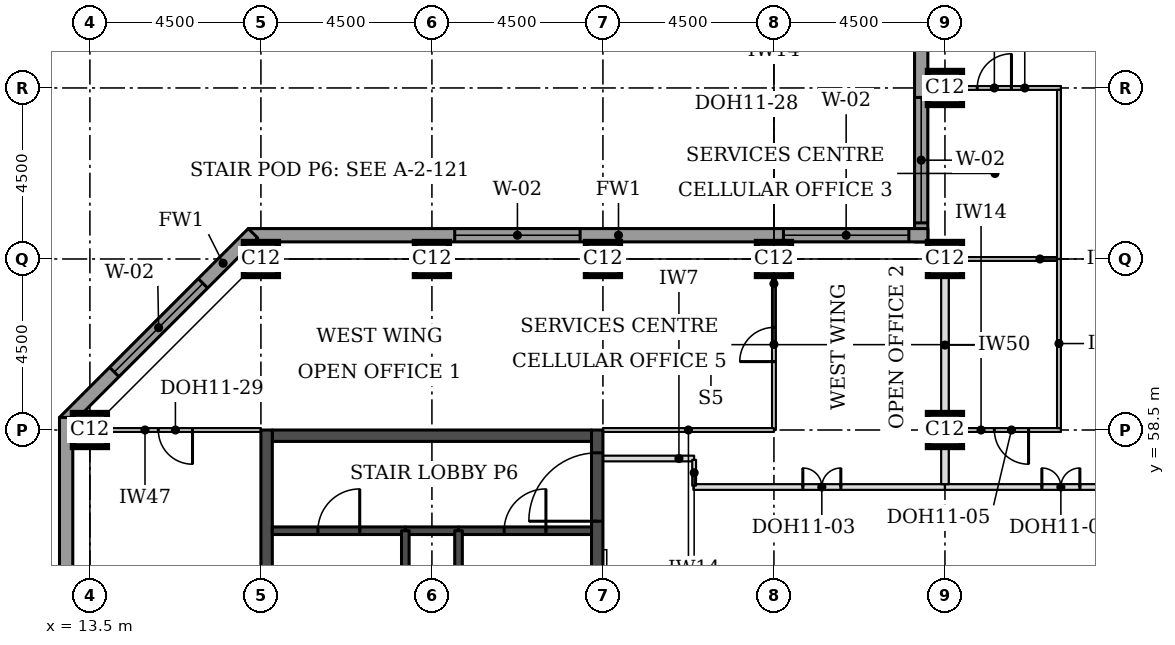
"""IFC4 building model, lengths in metres.
Left out: names, types, materials, properties, quantities, classifications, styles, units other than length and angle.
Written with IfcOpenShell. Run it as: python <this file> out.ifc"""

import sys

from ifc_helpers import new_model, si_unit, direction, frame, frame_2d, origin, origin_2d, place, context, subcontext, project, spatial, rectangle, extrude, element, fill, save


model = new_model("IFC4")
c1 = context("Model", 3, precision=1e-05, world=origin(), true_north=direction((0.0, 1.0)))
c2 = subcontext(c1, "Body", "Model", "MODEL_VIEW")
j1 = project(units=[si_unit("LENGTHUNIT", "METRE"), si_unit("PLANEANGLEUNIT", "RADIAN")], contexts=[c1])
p1 = place(None, origin())
s1 = spatial("IfcSite", under=j1, at=p1, CompositionType="ELEMENT")
p2 = place(p1, origin())
s2 = spatial("IfcBuilding", under=s1, at=p2, CompositionType="ELEMENT")
p3 = place(p2, frame((0.0, 0.0, 237.8)))
s3 = spatial("IfcBuildingStorey", under=s2, at=p3, CompositionType="ELEMENT", Elevation=237.8)
for number, where, z_axis, x_axis in (
    (1, (13.5, 58.5, 0.0), (0.0, 0.0, 1.0), (1.0, 0.0, 0.0)),
    (2, (36.0, 58.5, 0.0), (0.0, 0.0, 1.0), (1.0, 0.0, 0.0)),
    (3, (18.0, 63.0, 0.0), (0.0, 0.0, 1.0), (1.0, 0.0, 0.0)),
    (4, (22.5, 63.0, 0.0), (0.0, 0.0, 1.0), (1.0, 0.0, 0.0)),
    (5, (27.0, 63.0, 0.0), (0.0, 0.0, 1.0), (1.0, 0.0, 0.0)),
    (6, (31.5, 63.0, 0.0), (0.0, 0.0, 1.0), (1.0, 0.0, 0.0)),
    (7, (36.0, 63.0, 0.0), (0.0, 0.0, 1.0), (1.0, 0.0, 0.0)),
    (8, (36.0, 67.5, 0.0), (0.0, 0.0, 1.0), (1.0, 0.0, 0.0)),
):
    element("IfcColumn", number, at=place(p3, frame(where, z_axis=z_axis, x_axis=x_axis)), inside=s3, PredefinedType="COLUMN", context=c2, shape_type="SweptSolid", body=[
        extrude(rectangle(XDim=0.9, YDim=0.9, at=origin_2d()), origin(), (0.0, 0.0, 1.0), 3.7),
    ])
p4 = place(p3, frame((18.3, 58.35, 0.0), z_axis=(0.0, 0.0, 1.0), x_axis=(1.0, 0.0, 0.0)))
e9 = element("IfcWall", 9, at=p4, inside=s3, PredefinedType="SHEAR", context=c2, shape_type="SweptSolid", body=[
    extrude(rectangle(XDim=8.4, YDim=0.3, at=frame_2d((4.2, 0.0))), origin(), (0.0, 0.0, 1.0), 3.7),
])
p5 = place(p3, frame((18.15, 49.5, 0.0), z_axis=(0.0, 0.0, 1.0), x_axis=(0.0, 1.0, 0.0)))
e10 = element("IfcWall", 10, at=p5, inside=s3, PredefinedType="SHEAR", context=c2, shape_type="SweptSolid", body=[
    extrude(rectangle(XDim=9.0, YDim=0.3, at=frame_2d((4.5, 0.0))), origin(), (0.0, 0.0, 1.0), 3.7),
])
p6 = place(p3, frame((26.85, 49.5, 0.0), z_axis=(0.0, 0.0, 1.0), x_axis=(0.0, 1.0, 0.0)))
e11 = element("IfcWall", 11, at=p6, inside=s3, PredefinedType="SHEAR", context=c2, shape_type="SweptSolid", body=[
    extrude(rectangle(XDim=9.0, YDim=0.3, at=frame_2d((4.5, 0.0))), origin(), (0.0, 0.0, 1.0), 3.7),
])
p7 = place(p6, frame((6.6, 0.0, 0.0)))
e12 = element("IfcOpeningElement", 12, at=p7, cuts=e11, PredefinedType="OPENING", context=c2, shape_type="SweptSolid", body=[
    extrude(rectangle(XDim=1.8, YDim=2.1, at=frame_2d((0.9, 1.05))), frame((0.0, 0.16, 0.0), z_axis=(0.0, -1.0, 0.0), x_axis=(1.0, 0.0, 0.0)), (0.0, 0.0, 1.0), 0.32),
])
p8 = place(p3, frame((35.375, 76.831, 0.0), z_axis=(0.0, 0.0, 1.0), x_axis=(0.0, -1.0, 0.0)))
e13 = element("IfcWall", 13, at=p8, inside=s3, PredefinedType="STANDARD", context=c2, shape_type="SweptSolid", body=[
    extrude(rectangle(XDim=13.381, YDim=0.35, at=frame_2d((6.691, 0.0))), origin(), (0.0, 0.0, 1.0), 3.525),
])
p9 = place(p8, frame((9.581, 0.0, 0.9)))
e14 = element("IfcOpeningElement", 14, at=p9, cuts=e13, PredefinedType="OPENING", context=c2, shape_type="SweptSolid", body=[
    extrude(rectangle(XDim=3.3, YDim=1.9, at=frame_2d((1.65, 0.95))), frame((0.0, 0.185, 0.0), z_axis=(0.0, -1.0, 0.0), x_axis=(1.0, 0.0, 0.0)), (0.0, 0.0, 1.0), 0.37),
])
p10 = place(p3, frame((35.55, 63.625, 0.0), z_axis=(0.0, 0.0, 1.0), x_axis=(-1.0, 0.0, 0.0)))
e15 = element("IfcWall", 15, at=p10, inside=s3, PredefinedType="STANDARD", context=c2, shape_type="SweptSolid", body=[
    extrude(rectangle(XDim=17.881, YDim=0.35, at=frame_2d((8.941, 0.0))), origin(), (0.0, 0.0, 1.0), 3.525),
])
p11 = place(p10, frame((0.5, 0.0, 0.9)))
e16 = element("IfcOpeningElement", 16, at=p11, cuts=e15, PredefinedType="OPENING", context=c2, shape_type="SweptSolid", body=[
    extrude(rectangle(XDim=3.3, YDim=1.9, at=frame_2d((1.65, 0.95))), frame((0.0, 0.185, 0.0), z_axis=(0.0, -1.0, 0.0), x_axis=(1.0, 0.0, 0.0)), (0.0, 0.0, 1.0), 0.37),
])
p12 = place(p10, frame((9.15, 0.0, 0.9)))
e17 = element("IfcOpeningElement", 17, at=p12, cuts=e15, PredefinedType="OPENING", context=c2, shape_type="SweptSolid", body=[
    extrude(rectangle(XDim=3.3, YDim=1.9, at=frame_2d((1.65, 0.95))), frame((0.0, 0.185, 0.0), z_axis=(0.0, -1.0, 0.0), x_axis=(1.0, 0.0, 0.0)), (0.0, 0.0, 1.0), 0.37),
])
p13 = place(p3, frame((17.792, 63.676, 0.0), z_axis=(0.0, 0.0, 1.0), x_axis=(-0.707106781187, -0.707106781187, 0.0)))
e18 = element("IfcWall", 18, at=p13, inside=s3, PredefinedType="STANDARD", context=c2, shape_type="SweptSolid", body=[
    extrude(rectangle(XDim=7.027, YDim=0.35, at=frame_2d((3.513, 0.0))), origin(), (0.0, 0.0, 1.0), 3.525),
])
p14 = place(p13, frame((1.863, 0.0, 0.9)))
e19 = element("IfcOpeningElement", 19, at=p14, cuts=e18, PredefinedType="OPENING", context=c2, shape_type="SweptSolid", body=[
    extrude(rectangle(XDim=3.3, YDim=1.9, at=frame_2d((1.65, 0.95))), frame((0.0, 0.185, 0.0), z_axis=(0.0, -1.0, 0.0), x_axis=(1.0, 0.0, 0.0)), (0.0, 0.0, 1.0), 0.37),
])
p15 = place(p3, frame((12.875, 58.831, 0.0), z_axis=(0.0, 0.0, 1.0), x_axis=(0.0, -1.0, 0.0)))
e20 = element("IfcWall", 20, at=p15, inside=s3, PredefinedType="STANDARD", context=c2, shape_type="SweptSolid", body=[
    extrude(rectangle(XDim=14.163, YDim=0.35, at=frame_2d((7.081, 0.0))), origin(), (0.0, 0.0, 1.0), 3.525),
])
p16 = place(p15, frame((5.431, 0.0, 0.9)))
e21 = element("IfcOpeningElement", 21, at=p16, cuts=e20, PredefinedType="OPENING", context=c2, shape_type="SweptSolid", body=[
    extrude(rectangle(XDim=3.3, YDim=1.9, at=frame_2d((1.65, 0.95))), frame((0.0, 0.185, 0.0), z_axis=(0.0, -1.0, 0.0), x_axis=(1.0, 0.0, 0.0)), (0.0, 0.0, 1.0), 0.37),
])
p17 = place(p3, frame((29.38, 57.0, 0.0), z_axis=(0.0, 0.0, 1.0), x_axis=(1.0, 0.0, 0.0)))
e22 = element("IfcWall", 22, at=p17, inside=s3, PredefinedType="PARTITIONING", context=c2, shape_type="SweptSolid", body=[
    extrude(rectangle(XDim=6.62, YDim=0.15, at=frame_2d((3.31, 0.0))), origin(), (0.0, 0.0, 1.0), 3.55),
])
p18 = place(p17, frame((2.88, 0.0, 0.0)))
e23 = element("IfcOpeningElement", 23, at=p18, cuts=e22, PredefinedType="OPENING", context=c2, shape_type="SweptSolid", body=[
    extrude(rectangle(XDim=1.0, YDim=2.1, at=frame_2d((0.5, 1.05))), frame((0.0, 0.085, 0.0), z_axis=(0.0, -1.0, 0.0), x_axis=(1.0, 0.0, 0.0)), (0.0, 0.0, 1.0), 0.17),
])
p19 = place(p3, frame((36.0, 57.0, 0.0), z_axis=(0.0, 0.0, 1.0), x_axis=(1.0, 0.0, 0.0)))
e24 = element("IfcWall", 24, at=p19, inside=s3, PredefinedType="PARTITIONING", context=c2, shape_type="SweptSolid", body=[
    extrude(rectangle(XDim=6.075, YDim=0.15, at=frame_2d((3.038, 0.0))), origin(), (0.0, 0.0, 1.0), 3.55),
])
p20 = place(p19, frame((2.55, 0.0, 0.0)))
e25 = element("IfcOpeningElement", 25, at=p20, cuts=e24, PredefinedType="OPENING", context=c2, shape_type="SweptSolid", body=[
    extrude(rectangle(XDim=1.0, YDim=2.1, at=frame_2d((0.5, 1.05))), frame((0.0, 0.085, 0.0), z_axis=(0.0, -1.0, 0.0), x_axis=(1.0, 0.0, 0.0)), (0.0, 0.0, 1.0), 0.17),
])
p21 = place(p3, frame((36.45, 58.5, 0.0), z_axis=(0.0, 0.0, 1.0), x_axis=(1.0, 0.0, 0.0)))
e26 = element("IfcWall", 26, at=p21, inside=s3, PredefinedType="PARTITIONING", context=c2, shape_type="SweptSolid", body=[
    extrude(rectangle(XDim=2.6, YDim=0.1, at=frame_2d((1.3, 0.0))), origin(), (0.0, 0.0, 1.0), 3.55),
])
p22 = place(p21, frame((0.85, 0.0, 0.0)))
e27 = element("IfcOpeningElement", 27, at=p22, cuts=e26, PredefinedType="OPENING", context=c2, shape_type="SweptSolid", body=[
    extrude(rectangle(XDim=0.9, YDim=2.1, at=frame_2d((0.45, 1.05))), frame((0.0, 0.06, 0.0), z_axis=(0.0, -1.0, 0.0), x_axis=(1.0, 0.0, 0.0)), (0.0, 0.0, 1.0), 0.12),
])
p23 = place(p3, frame((36.45, 63.0, 0.0), z_axis=(0.0, 0.0, 1.0), x_axis=(1.0, 0.0, 0.0)))
e28 = element("IfcWall", 28, at=p23, inside=s3, PredefinedType="PARTITIONING", context=c2, shape_type="SweptSolid", body=[
    extrude(rectangle(XDim=2.5, YDim=0.1, at=frame_2d((1.25, 0.0))), origin(), (0.0, 0.0, 1.0), 3.55),
])
p24 = place(p3, frame((35.55, 67.5, 0.0), z_axis=(0.0, 0.0, 1.0), x_axis=(1.0, 0.0, 0.0)))
e29 = element("IfcWall", 29, at=p24, inside=s3, PredefinedType="PARTITIONING", context=c2, shape_type="SweptSolid", body=[
    extrude(rectangle(XDim=3.5, YDim=0.1, at=frame_2d((1.75, 0.0))), origin(), (0.0, 0.0, 1.0), 3.55),
])
p25 = place(p24, frame((1.3, 0.0, 0.0)))
e30 = element("IfcOpeningElement", 30, at=p25, cuts=e29, PredefinedType="OPENING", context=c2, shape_type="SweptSolid", body=[
    extrude(rectangle(XDim=0.9, YDim=2.1, at=frame_2d((0.45, 1.05))), frame((0.0, 0.06, 0.0), z_axis=(0.0, -1.0, 0.0), x_axis=(1.0, 0.0, 0.0)), (0.0, 0.0, 1.0), 0.12),
])
p26 = place(p3, frame((36.0, 57.075, 0.0), z_axis=(0.0, 0.0, 1.0), x_axis=(0.0, 1.0, 0.0)))
e31 = element("IfcWall", 31, at=p26, inside=s3, PredefinedType="PARTITIONING", context=c2, shape_type="SweptSolid", body=[
    extrude(rectangle(XDim=0.975, YDim=0.2, at=frame_2d((0.488, 0.0))), origin(), (0.0, 0.0, 1.0), 2.8),
])
p27 = place(p3, frame((39.0, 58.55, 0.0), z_axis=(0.0, 0.0, 1.0), x_axis=(0.0, 1.0, 0.0)))
e32 = element("IfcWall", 32, at=p27, inside=s3, PredefinedType="PARTITIONING", context=c2, shape_type="SweptSolid", body=[
    extrude(rectangle(XDim=4.45, YDim=0.1, at=frame_2d((2.225, 0.0))), origin(), (0.0, 0.0, 1.0), 3.55),
])
p28 = place(p3, frame((36.0, 58.92, 0.0), z_axis=(0.0, 0.0, 1.0), x_axis=(0.0, 1.0, 0.0)))
e33 = element("IfcWall", 33, at=p28, inside=s3, PredefinedType="PARTITIONING", context=c2, shape_type="SweptSolid", body=[
    extrude(rectangle(XDim=3.63, YDim=0.2, at=frame_2d((1.815, 0.0))), origin(), (0.0, 0.0, 1.0), 2.8),
])
p29 = place(p3, frame((39.0, 63.0, 0.0), z_axis=(0.0, 0.0, 1.0), x_axis=(0.0, 1.0, 0.0)))
e34 = element("IfcWall", 34, at=p29, inside=s3, PredefinedType="PARTITIONING", context=c2, shape_type="SweptSolid", body=[
    extrude(rectangle(XDim=4.45, YDim=0.1, at=frame_2d((2.225, 0.0))), origin(), (0.0, 0.0, 1.0), 3.55),
])
p30 = place(p3, frame((31.5, 63.0, 0.0), z_axis=(0.0, 0.0, 1.0), x_axis=(0.0, -1.0, 0.0)))
e35 = element("IfcWall", 35, at=p30, inside=s3, PredefinedType="PARTITIONING", context=c2, shape_type="SweptSolid", body=[
    extrude(rectangle(XDim=4.5, YDim=0.1, at=frame_2d((2.25, 0.0))), origin(), (0.0, 0.0, 1.0), 3.55),
])
p31 = place(p30, frame((1.8, 0.0, 0.0)))
e36 = element("IfcOpeningElement", 36, at=p31, cuts=e35, PredefinedType="OPENING", context=c2, shape_type="SweptSolid", body=[
    extrude(rectangle(XDim=0.9, YDim=2.1, at=frame_2d((0.45, 1.05))), frame((0.0, 0.06, 0.0), z_axis=(0.0, -1.0, 0.0), x_axis=(1.0, 0.0, 0.0)), (0.0, 0.0, 1.0), 0.12),
])
p32 = place(p3, frame((31.5, 58.5, 0.0), z_axis=(0.0, 0.0, 1.0), x_axis=(-1.0, 0.0, 0.0)))
e37 = element("IfcWall", 37, at=p32, inside=s3, PredefinedType="PARTITIONING", context=c2, shape_type="SweptSolid", body=[
    extrude(rectangle(XDim=4.5, YDim=0.1, at=frame_2d((2.25, 0.0))), origin(), (0.0, 0.0, 1.0), 2.55),
])
p33 = place(p3, frame((13.5, 58.5, 0.0), z_axis=(0.0, 0.0, 1.0), x_axis=(1.0, 0.0, 0.0)))
e38 = element("IfcWall", 38, at=p33, inside=s3, PredefinedType="PARTITIONING", context=c2, shape_type="SweptSolid", body=[
    extrude(rectangle(XDim=4.5, YDim=0.1, at=frame_2d((2.25, 0.0))), origin(), (0.0, 0.0, 1.0), 2.55),
])
p34 = place(p33, frame((1.8, 0.0, 0.0)))
e39 = element("IfcOpeningElement", 39, at=p34, cuts=e38, PredefinedType="OPENING", context=c2, shape_type="SweptSolid", body=[
    extrude(rectangle(XDim=0.9, YDim=2.1, at=frame_2d((0.45, 1.05))), frame((0.0, 0.06, 0.0), z_axis=(0.0, -1.0, 0.0), x_axis=(1.0, 0.0, 0.0)), (0.0, 0.0, 1.0), 0.12),
])
p35 = place(p3, frame((27.0, 57.75, 0.0), z_axis=(0.0, 0.0, 1.0), x_axis=(1.0, 0.0, 0.0)))
e40 = element("IfcWall", 40, at=p35, inside=s3, PredefinedType="PARTITIONING", context=c2, shape_type="SweptSolid", body=[
    extrude(rectangle(XDim=2.4, YDim=0.15, at=frame_2d((1.2, 0.0))), origin(), (0.0, 0.0, 1.0), 3.55),
])
p36 = place(p3, frame((29.4, 57.715, 0.0), z_axis=(0.0, 0.0, 1.0), x_axis=(0.0, -1.0, 0.0)))
e41 = element("IfcWall", 41, at=p36, inside=s3, PredefinedType="PARTITIONING", context=c2, shape_type="SweptSolid", body=[
    extrude(rectangle(XDim=0.68, YDim=0.1, at=frame_2d((0.34, 0.0))), origin(), (0.0, 0.0, 1.0), 3.55),
])
p37 = place(p3, frame((21.8, 55.85, 0.0), z_axis=(0.0, 0.0, 1.0), x_axis=(1.0, 0.0, 0.0)))
e42 = element("IfcWall", 42, at=p37, inside=s3, PredefinedType="SOLIDWALL", context=c2, shape_type="SweptSolid", body=[
    extrude(rectangle(XDim=1.4, YDim=0.2, at=frame_2d((0.7, 0.0))), origin(), (0.0, 0.0, 1.0), 3.55),
])
p38 = place(p3, frame((18.3, 55.85, 0.0), z_axis=(0.0, 0.0, 1.0), x_axis=(1.0, 0.0, 0.0)))
e43 = element("IfcWall", 43, at=p38, inside=s3, PredefinedType="SOLIDWALL", context=c2, shape_type="SweptSolid", body=[
    extrude(rectangle(XDim=3.5, YDim=0.2, at=frame_2d((1.75, 0.0))), origin(), (0.0, 0.0, 1.0), 3.55),
])
p39 = place(p38, frame((1.2, 0.0, 0.0)))
e44 = element("IfcOpeningElement", 44, at=p39, cuts=e43, PredefinedType="OPENING", context=c2, shape_type="SweptSolid", body=[
    extrude(rectangle(XDim=1.1, YDim=2.1, at=frame_2d((0.55, 1.05))), frame((0.0, 0.11, 0.0), z_axis=(0.0, -1.0, 0.0), x_axis=(1.0, 0.0, 0.0)), (0.0, 0.0, 1.0), 0.22),
])
p40 = place(p3, frame((23.2, 55.85, 0.0), z_axis=(0.0, 0.0, 1.0), x_axis=(1.0, 0.0, 0.0)))
e45 = element("IfcWall", 45, at=p40, inside=s3, PredefinedType="SOLIDWALL", context=c2, shape_type="SweptSolid", body=[
    extrude(rectangle(XDim=3.5, YDim=0.2, at=frame_2d((1.75, 0.0))), origin(), (0.0, 0.0, 1.0), 3.55),
])
p41 = place(p40, frame((1.2, 0.0, 0.0)))
e46 = element("IfcOpeningElement", 46, at=p41, cuts=e45, PredefinedType="OPENING", context=c2, shape_type="SweptSolid", body=[
    extrude(rectangle(XDim=1.1, YDim=2.1, at=frame_2d((0.55, 1.05))), frame((0.0, 0.11, 0.0), z_axis=(0.0, -1.0, 0.0), x_axis=(1.0, 0.0, 0.0)), (0.0, 0.0, 1.0), 0.22),
])
for number, where, z_axis, x_axis in (
    (47, (21.8, 49.8, 0.0), (0.0, 0.0, 1.0), (0.0, 1.0, 0.0)),
    (48, (23.2, 49.8, 0.0), (0.0, 0.0, 1.0), (0.0, 1.0, 0.0)),
):
    element("IfcWall", number, at=place(p3, frame(where, z_axis=z_axis, x_axis=x_axis)), inside=s3, PredefinedType="SOLIDWALL", context=c2, shape_type="SweptSolid", body=[
        extrude(rectangle(XDim=6.05, YDim=0.2, at=frame_2d((3.025, 0.0))), origin(), (0.0, 0.0, 1.0), 3.55),
    ])
p42 = place(p9, origin())
e49 = element("IfcWindow", 49, at=p42, inside=s3, PartitioningType="SINGLE_PANEL", PredefinedType="WINDOW", context=c2, shape_type="SweptSolid", body=[
    extrude(rectangle(XDim=3.3, YDim=1.9, at=frame_2d((1.65, 0.95))), frame((0.0, 0.085, 0.0), z_axis=(0.0, -1.0, 0.0), x_axis=(1.0, 0.0, 0.0)), (0.0, 0.0, 1.0), 0.06),
])
fill(e14, e49)
p43 = place(p11, origin())
e50 = element("IfcWindow", 50, at=p43, inside=s3, PartitioningType="SINGLE_PANEL", PredefinedType="WINDOW", context=c2, shape_type="SweptSolid", body=[
    extrude(rectangle(XDim=3.3, YDim=1.9, at=frame_2d((1.65, 0.95))), frame((0.0, 0.085, 0.0), z_axis=(0.0, -1.0, 0.0), x_axis=(1.0, 0.0, 0.0)), (0.0, 0.0, 1.0), 0.06),
])
fill(e16, e50)
p44 = place(p12, origin())
e51 = element("IfcWindow", 51, at=p44, inside=s3, PartitioningType="SINGLE_PANEL", PredefinedType="WINDOW", context=c2, shape_type="SweptSolid", body=[
    extrude(rectangle(XDim=3.3, YDim=1.9, at=frame_2d((1.65, 0.95))), frame((0.0, 0.085, 0.0), z_axis=(0.0, -1.0, 0.0), x_axis=(1.0, 0.0, 0.0)), (0.0, 0.0, 1.0), 0.06),
])
fill(e17, e51)
p45 = place(p14, origin())
e52 = element("IfcWindow", 52, at=p45, inside=s3, PartitioningType="SINGLE_PANEL", PredefinedType="WINDOW", context=c2, shape_type="SweptSolid", body=[
    extrude(rectangle(XDim=3.3, YDim=1.9, at=frame_2d((1.65, 0.95))), frame((0.0, 0.085, 0.0), z_axis=(0.0, -1.0, 0.0), x_axis=(1.0, 0.0, 0.0)), (0.0, 0.0, 1.0), 0.06),
])
fill(e19, e52)
p46 = place(p20, origin())
e53 = element("IfcDoor", 53, at=p46, inside=s3, OperationType="DOUBLE_DOOR_SINGLE_SWING", PredefinedType="DOOR", context=c2, shape_type="SweptSolid", body=[
    extrude(rectangle(XDim=1.0, YDim=2.1, at=frame_2d((0.5, 1.05))), frame((0.0, 0.025, 0.0), z_axis=(0.0, -1.0, 0.0), x_axis=(1.0, 0.0, 0.0)), (0.0, 0.0, 1.0), 0.05),
])
fill(e25, e53)
p47 = place(p22, frame((0.9, 0.0, 0.0), z_axis=(0.0, 0.0, 1.0), x_axis=(-1.0, 0.0, 0.0)))
e54 = element("IfcDoor", 54, at=p47, inside=s3, OperationType="SINGLE_SWING_LEFT", PredefinedType="DOOR", context=c2, shape_type="SweptSolid", body=[
    extrude(rectangle(XDim=0.9, YDim=2.1, at=frame_2d((0.45, 1.05))), frame((0.0, 0.025, 0.0), z_axis=(0.0, -1.0, 0.0), x_axis=(1.0, 0.0, 0.0)), (0.0, 0.0, 1.0), 0.05),
])
fill(e27, e54)
p48 = place(p25, origin())
e55 = element("IfcDoor", 55, at=p48, inside=s3, OperationType="SINGLE_SWING_RIGHT", PredefinedType="DOOR", context=c2, shape_type="SweptSolid", body=[
    extrude(rectangle(XDim=0.9, YDim=2.1, at=frame_2d((0.45, 1.05))), frame((0.0, 0.025, 0.0), z_axis=(0.0, -1.0, 0.0), x_axis=(1.0, 0.0, 0.0)), (0.0, 0.0, 1.0), 0.05),
])
fill(e30, e55)
p49 = place(p18, origin())
e56 = element("IfcDoor", 56, at=p49, inside=s3, OperationType="DOUBLE_DOOR_SINGLE_SWING", PredefinedType="DOOR", context=c2, shape_type="SweptSolid", body=[
    extrude(rectangle(XDim=1.0, YDim=2.1, at=frame_2d((0.5, 1.05))), frame((0.0, 0.025, 0.0), z_axis=(0.0, -1.0, 0.0), x_axis=(1.0, 0.0, 0.0)), (0.0, 0.0, 1.0), 0.05),
])
fill(e23, e56)
p50 = place(p31, frame((0.9, 0.0, 0.0), z_axis=(0.0, 0.0, 1.0), x_axis=(-1.0, 0.0, 0.0)))
e57 = element("IfcDoor", 57, at=p50, inside=s3, OperationType="SINGLE_SWING_LEFT", PredefinedType="DOOR", context=c2, shape_type="SweptSolid", body=[
    extrude(rectangle(XDim=0.9, YDim=2.1, at=frame_2d((0.45, 1.05))), frame((0.0, 0.025, 0.0), z_axis=(0.0, -1.0, 0.0), x_axis=(1.0, 0.0, 0.0)), (0.0, 0.0, 1.0), 0.05),
])
fill(e36, e57)
p51 = place(p34, frame((0.9, 0.0, 0.0), z_axis=(0.0, 0.0, 1.0), x_axis=(-1.0, 0.0, 0.0)))
e58 = element("IfcDoor", 58, at=p51, inside=s3, OperationType="SINGLE_SWING_LEFT", PredefinedType="DOOR", context=c2, shape_type="SweptSolid", body=[
    extrude(rectangle(XDim=0.9, YDim=2.1, at=frame_2d((0.45, 1.05))), frame((0.0, 0.025, 0.0), z_axis=(0.0, -1.0, 0.0), x_axis=(1.0, 0.0, 0.0)), (0.0, 0.0, 1.0), 0.05),
])
fill(e39, e58)
p52 = place(p39, origin())
e59 = element("IfcDoor", 59, at=p52, inside=s3, OperationType="SINGLE_SWING_RIGHT", PredefinedType="DOOR", context=c2, shape_type="SweptSolid", body=[
    extrude(rectangle(XDim=1.1, YDim=2.1, at=frame_2d((0.55, 1.05))), frame((0.0, 0.025, 0.0), z_axis=(0.0, -1.0, 0.0), x_axis=(1.0, 0.0, 0.0)), (0.0, 0.0, 1.0), 0.05),
])
fill(e44, e59)
p53 = place(p41, origin())
e60 = element("IfcDoor", 60, at=p53, inside=s3, OperationType="SINGLE_SWING_RIGHT", PredefinedType="DOOR", context=c2, shape_type="SweptSolid", body=[
    extrude(rectangle(XDim=1.1, YDim=2.1, at=frame_2d((0.55, 1.05))), frame((0.0, 0.025, 0.0), z_axis=(0.0, -1.0, 0.0), x_axis=(1.0, 0.0, 0.0)), (0.0, 0.0, 1.0), 0.05),
])
fill(e46, e60)
p54 = place(p7, origin())
e61 = element("IfcDoor", 61, at=p54, inside=s3, OperationType="SINGLE_SWING_LEFT", PredefinedType="DOOR", context=c2, shape_type="SweptSolid", body=[
    extrude(rectangle(XDim=1.8, YDim=2.1, at=frame_2d((0.9, 1.05))), frame((0.0, 0.025, 0.0), z_axis=(0.0, -1.0, 0.0), x_axis=(1.0, 0.0, 0.0)), (0.0, 0.0, 1.0), 0.05),
])
fill(e12, e61)
save(model, sys.argv[1])
